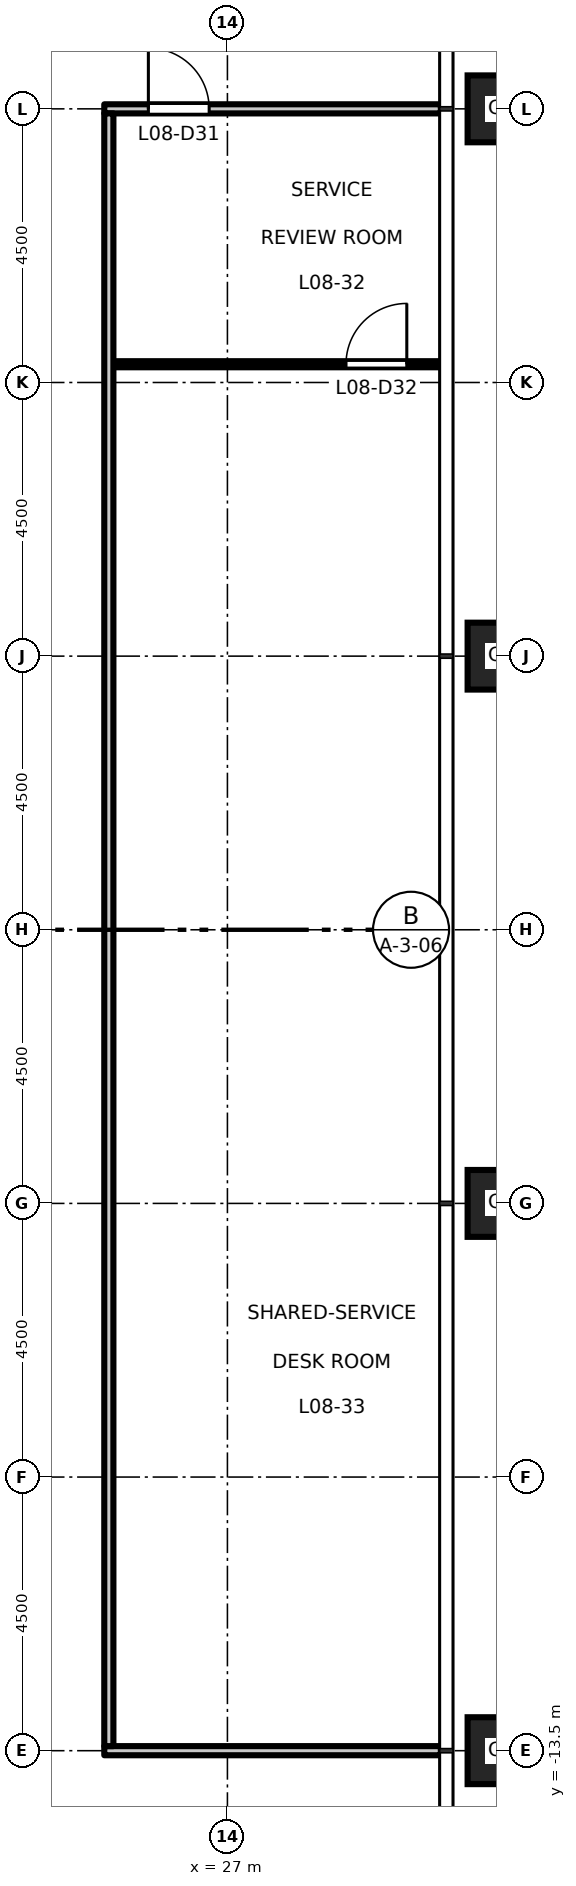
"""IFC4 building model, lengths in metres.
Left out: names, types, materials, properties, quantities, classifications, styles, units other than length and angle.
Written with IfcOpenShell. Run it as: python <this file> out.ifc"""

import sys

from ifc_helpers import new_model, si_unit, direction, frame, frame_2d, origin, origin_2d, place, context, subcontext, project, spatial, rectangle, hollow_rectangle, extrude, element, fill, save


model = new_model("IFC4")
c1 = context("Model", 3, precision=1e-05, world=origin(), true_north=direction((0.0, 1.0)))
c2 = subcontext(c1, "Body", "Model", "MODEL_VIEW")
j1 = project(units=[si_unit("LENGTHUNIT", "METRE"), si_unit("PLANEANGLEUNIT", "RADIAN")], contexts=[c1])
p1 = place(None, origin())
s1 = spatial("IfcSite", under=j1, at=p1, CompositionType="ELEMENT")
p2 = place(p1, origin())
s2 = spatial("IfcBuilding", under=s1, at=p2, CompositionType="ELEMENT")
p3 = place(p2, frame((0.0, 0.0, 40.2)))
s3 = spatial("IfcBuildingStorey", under=s2, at=p3, CompositionType="ELEMENT", Elevation=40.2)
for number, where, z_axis, x_axis in (
    (1, (31.5, -13.5, 0.0), (0.0, 0.0, 1.0), (1.0, 0.0, 0.0)),
    (2, (31.5, -4.5, 0.0), (0.0, 0.0, 1.0), (1.0, 0.0, 0.0)),
    (3, (31.5, 4.5, 0.0), (0.0, 0.0, 1.0), (1.0, 0.0, 0.0)),
    (4, (31.5, 13.5, 0.0), (0.0, 0.0, 1.0), (1.0, 0.0, 0.0)),
):
    element("IfcColumn", number, at=place(p3, frame(where, z_axis=z_axis, x_axis=x_axis)), inside=s3, PredefinedType="COLUMN", context=c2, shape_type="SweptSolid", body=[
        extrude(hollow_rectangle(XDim=1.1, YDim=1.1, WallThickness=0.07, at=origin_2d()), origin(), (0.0, 0.0, 1.0), 4.5),
    ])
p4 = place(p3, frame((24.975, -13.5, 0.0), z_axis=(0.0, 0.0, 1.0), x_axis=(1.0, 0.0, 0.0)))
e5 = element("IfcWall", 5, at=p4, inside=s3, PredefinedType="PARTITIONING", context=c2, shape_type="SweptSolid", body=[
    extrude(rectangle(XDim=5.535, YDim=0.15, at=frame_2d((2.768, 0.0))), origin(), (0.0, 0.0, 1.0), 3.35),
])
p5 = place(p3, frame((25.125, 9.3, 0.0), z_axis=(0.0, 0.0, 1.0), x_axis=(1.0, 0.0, 0.0)))
e6 = element("IfcWall", 6, at=p5, inside=s3, PredefinedType="PARTITIONING", context=c2, shape_type="SweptSolid", body=[
    extrude(rectangle(XDim=5.385, YDim=0.1, at=frame_2d((2.692, 0.0))), origin(), (0.0, 0.0, 1.0), 4.35),
])
p6 = place(p5, frame((3.825, 0.0, 0.0)))
e7 = element("IfcOpeningElement", 7, at=p6, cuts=e6, PredefinedType="OPENING", context=c2, shape_type="SweptSolid", body=[
    extrude(rectangle(XDim=1.0, YDim=2.1, at=frame_2d((0.5, 1.05))), frame((0.0, 0.06, 0.0), z_axis=(0.0, -1.0, 0.0), x_axis=(1.0, 0.0, 0.0)), (0.0, 0.0, 1.0), 0.12),
])
p7 = place(p3, frame((24.975, 13.5, 0.0), z_axis=(0.0, 0.0, 1.0), x_axis=(1.0, 0.0, 0.0)))
e8 = element("IfcWall", 8, at=p7, inside=s3, PredefinedType="PARTITIONING", context=c2, shape_type="SweptSolid", body=[
    extrude(rectangle(XDim=5.535, YDim=0.15, at=frame_2d((2.768, 0.0))), origin(), (0.0, 0.0, 1.0), 3.35),
])
p8 = place(p7, frame((0.725, 0.0, 0.0)))
e9 = element("IfcOpeningElement", 9, at=p8, cuts=e8, PredefinedType="OPENING", context=c2, shape_type="SweptSolid", body=[
    extrude(rectangle(XDim=1.0, YDim=2.1, at=frame_2d((0.5, 1.05))), frame((0.0, 0.085, 0.0), z_axis=(0.0, -1.0, 0.0), x_axis=(1.0, 0.0, 0.0)), (0.0, 0.0, 1.0), 0.17),
])
p9 = place(p3, frame((25.05, -13.425, 0.0), z_axis=(0.0, 0.0, 1.0), x_axis=(0.0, 1.0, 0.0)))
e10 = element("IfcWall", 10, at=p9, inside=s3, PredefinedType="PARTITIONING", context=c2, shape_type="SweptSolid", body=[
    extrude(rectangle(XDim=26.85, YDim=0.15, at=frame_2d((13.425, 0.0))), origin(), (0.0, 0.0, 1.0), 4.35),
])
p10 = place(p8, origin())
e11 = element("IfcDoor", 11, at=p10, inside=s3, OperationType="SINGLE_SWING_LEFT", PredefinedType="DOOR", context=c2, shape_type="SweptSolid", body=[
    extrude(rectangle(XDim=1.0, YDim=2.1, at=frame_2d((0.5, 1.05))), frame((0.0, 0.025, 0.0), z_axis=(0.0, -1.0, 0.0), x_axis=(1.0, 0.0, 0.0)), (0.0, 0.0, 1.0), 0.05),
])
fill(e9, e11)
p11 = place(p6, origin())
e12 = element("IfcDoor", 12, at=p11, inside=s3, OperationType="SINGLE_SWING_RIGHT", PredefinedType="DOOR", context=c2, shape_type="SweptSolid", body=[
    extrude(rectangle(XDim=1.0, YDim=2.1, at=frame_2d((0.5, 1.05))), frame((0.0, 0.025, 0.0), z_axis=(0.0, -1.0, 0.0), x_axis=(1.0, 0.0, 0.0)), (0.0, 0.0, 1.0), 0.05),
])
fill(e7, e12)
save(model, sys.argv[1])
